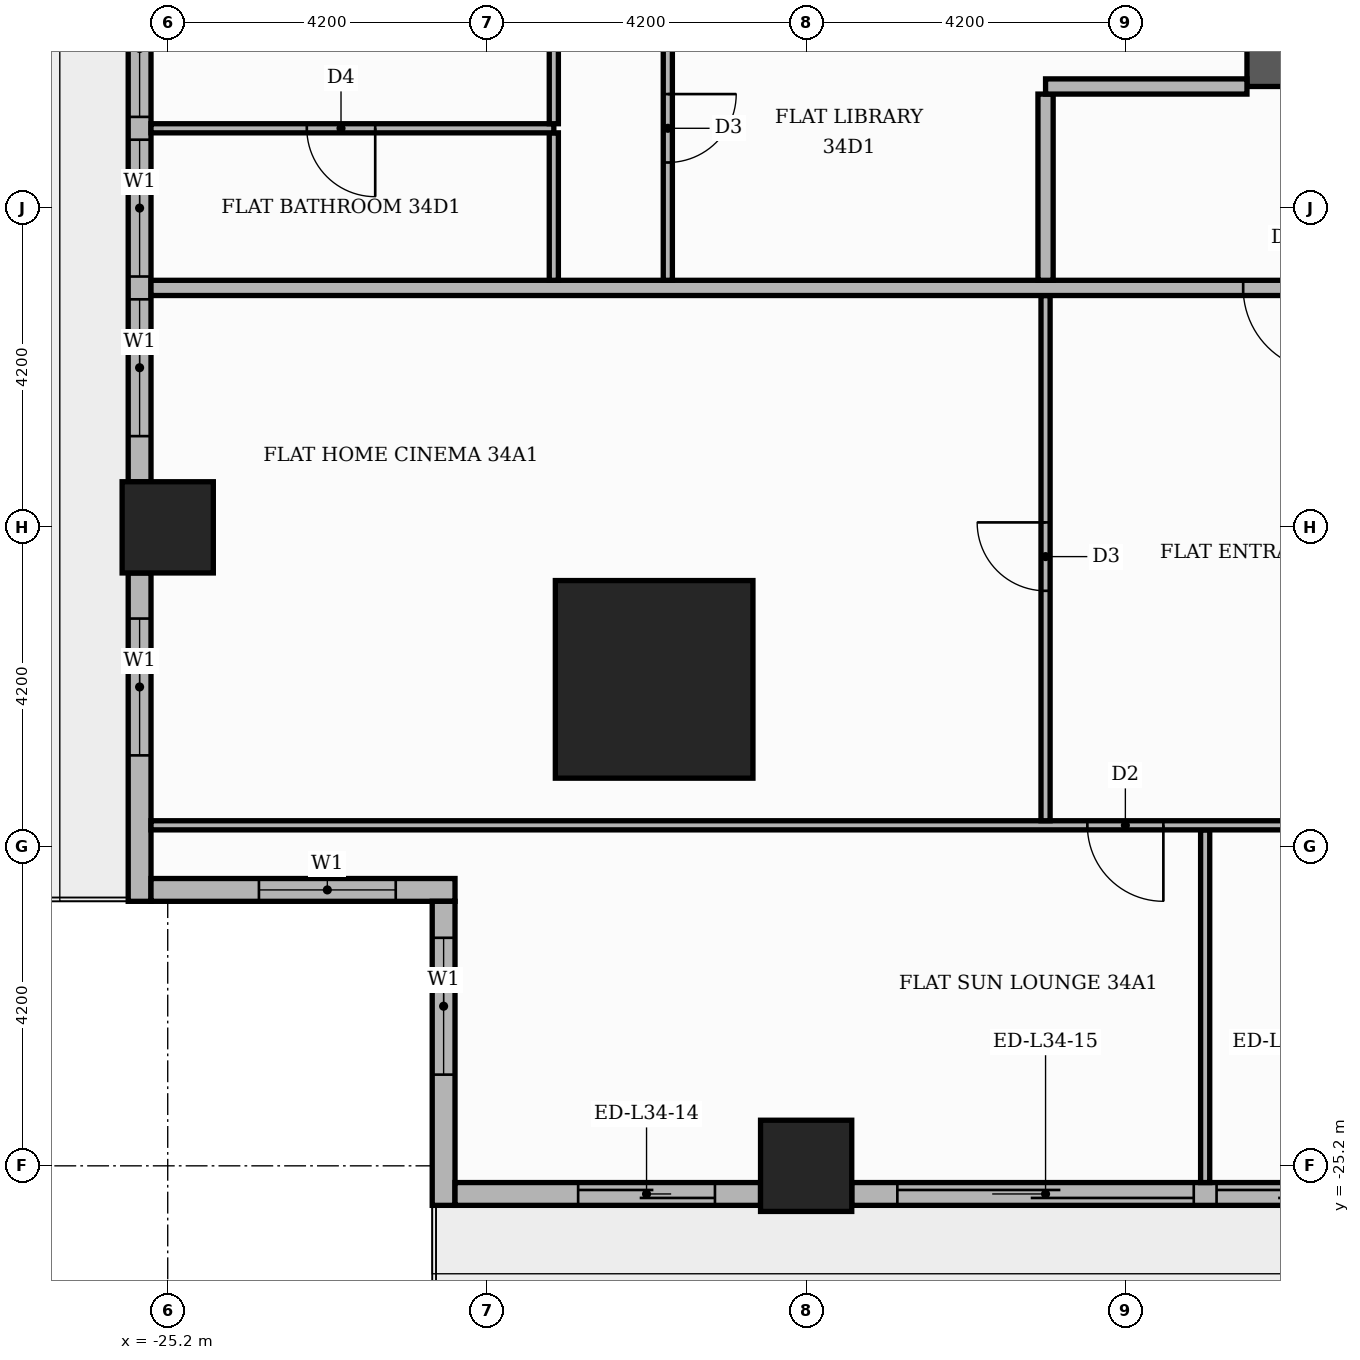
"""IFC4 building model, lengths in metres.
Left out: names, types, materials, properties, quantities, classifications, styles, units other than length and angle.
Written with IfcOpenShell. Run it as: python <this file> out.ifc"""

import sys

from ifc_helpers import new_model, si_unit, direction, frame, frame_2d, origin, origin_2d, place, context, subcontext, project, spatial, rectangle, extrude, element, fill, save


model = new_model("IFC4")
c1 = context("Model", 3, precision=1e-05, world=origin(), true_north=direction((0.0, 1.0)))
c2 = subcontext(c1, "Body", "Model", "MODEL_VIEW")
j1 = project(units=[si_unit("LENGTHUNIT", "METRE"), si_unit("PLANEANGLEUNIT", "RADIAN")], contexts=[c1])
p1 = place(None, origin())
s1 = spatial("IfcSite", under=j1, at=p1, CompositionType="ELEMENT")
p2 = place(p1, origin())
s2 = spatial("IfcBuilding", under=s1, at=p2, CompositionType="ELEMENT")
p3 = place(p2, frame((0.0, 0.0, 145.5)))
s3 = spatial("IfcBuildingStorey", under=s2, at=p3, CompositionType="ELEMENT", Elevation=145.5)
p4 = place(p3, frame((-11.0, -10.55, 0.0), z_axis=(0.0, 0.0, 1.0), x_axis=(1.0, 0.0, 0.0)))
e1 = element("IfcWall", 1, at=p4, inside=s3, PredefinedType="SHEAR", context=c2, shape_type="SweptSolid", body=[
    extrude(rectangle(XDim=22.0, YDim=0.9, at=frame_2d((11.0, 0.0))), origin(), (0.0, 0.0, 1.0), 3.48),
])
p5 = place(p4, frame((7.4, 0.0, 0.0)))
e2 = element("IfcOpeningElement", 2, at=p5, cuts=e1, PredefinedType="OPENING", context=c2, shape_type="SweptSolid", body=[
    extrude(rectangle(XDim=1.8, YDim=2.2, at=frame_2d((0.9, 1.1))), frame((0.0, 0.46, 0.0), z_axis=(0.0, -1.0, 0.0), x_axis=(1.0, 0.0, 0.0)), (0.0, 0.0, 1.0), 0.92),
])
p6 = place(p3, frame((-18.8, -18.8, 0.0), z_axis=(0.0, 0.0, 1.0), x_axis=(1.0, 0.0, 0.0)))
e3 = element("IfcColumn", 3, at=p6, inside=s3, PredefinedType="COLUMN", context=c2, shape_type="SweptSolid", body=[
    extrude(rectangle(XDim=2.6, YDim=2.6, at=origin_2d()), origin(), (0.0, 0.0, 1.0), 3.9),
])
for number, where, z_axis, x_axis in (
    (4, (-16.8, -25.2, 0.0), (0.0, 0.0, 1.0), (1.0, 0.0, 0.0)),
    (5, (-25.2, -16.8, 0.0), (0.0, 0.0, 1.0), (1.0, 0.0, 0.0)),
):
    element("IfcColumn", number, at=place(p3, frame(where, z_axis=z_axis, x_axis=x_axis)), inside=s3, PredefinedType="COLUMN", context=c2, shape_type="SweptSolid", body=[
        extrude(rectangle(XDim=1.2, YDim=1.2, at=origin_2d()), origin(), (0.0, 0.0, 1.0), 3.9),
    ])
p7 = place(p3, frame((-25.57, -9.0, 0.0), z_axis=(0.0, 0.0, 1.0), x_axis=(0.0, -1.0, 0.0)))
e6 = element("IfcWall", 6, at=p7, inside=s3, PredefinedType="STANDARD", context=c2, shape_type="SweptSolid", body=[
    extrude(rectangle(XDim=7.2, YDim=0.3, at=frame_2d((3.6, 0.0))), origin(), (0.0, 0.0, 1.0), 3.48),
])
p8 = place(p7, frame((0.6, 0.0, 0.9)))
e7 = element("IfcOpeningElement", 7, at=p8, cuts=e6, PredefinedType="OPENING", context=c2, shape_type="SweptSolid", body=[
    extrude(rectangle(XDim=1.8, YDim=2.1, at=frame_2d((0.9, 1.05))), frame((0.0, 0.16, 0.0), z_axis=(0.0, -1.0, 0.0), x_axis=(1.0, 0.0, 0.0)), (0.0, 0.0, 1.0), 0.32),
])
p9 = place(p7, frame((2.7, 0.0, 0.9)))
e8 = element("IfcOpeningElement", 8, at=p9, cuts=e6, PredefinedType="OPENING", context=c2, shape_type="SweptSolid", body=[
    extrude(rectangle(XDim=1.8, YDim=2.1, at=frame_2d((0.9, 1.05))), frame((0.0, 0.16, 0.0), z_axis=(0.0, -1.0, 0.0), x_axis=(1.0, 0.0, 0.0)), (0.0, 0.0, 1.0), 0.32),
])
p10 = place(p7, frame((4.8, 0.0, 0.9)))
e9 = element("IfcOpeningElement", 9, at=p10, cuts=e6, PredefinedType="OPENING", context=c2, shape_type="SweptSolid", body=[
    extrude(rectangle(XDim=1.8, YDim=2.1, at=frame_2d((0.9, 1.05))), frame((0.0, 0.16, 0.0), z_axis=(0.0, -1.0, 0.0), x_axis=(1.0, 0.0, 0.0)), (0.0, 0.0, 1.0), 0.32),
])
p11 = place(p3, frame((-25.57, -17.4, 0.0), z_axis=(0.0, 0.0, 1.0), x_axis=(0.0, -1.0, 0.0)))
e10 = element("IfcWall", 10, at=p11, inside=s3, PredefinedType="STANDARD", context=c2, shape_type="SweptSolid", body=[
    extrude(rectangle(XDim=4.32, YDim=0.3, at=frame_2d((2.16, 0.0))), origin(), (0.0, 0.0, 1.0), 3.48),
])
p12 = place(p11, frame((0.6, 0.0, 0.9)))
e11 = element("IfcOpeningElement", 11, at=p12, cuts=e10, PredefinedType="OPENING", context=c2, shape_type="SweptSolid", body=[
    extrude(rectangle(XDim=1.8, YDim=2.1, at=frame_2d((0.9, 1.05))), frame((0.0, 0.16, 0.0), z_axis=(0.0, -1.0, 0.0), x_axis=(1.0, 0.0, 0.0)), (0.0, 0.0, 1.0), 0.32),
])
p13 = place(p3, frame((-25.42, -21.57, 0.0), z_axis=(0.0, 0.0, 1.0), x_axis=(1.0, 0.0, 0.0)))
e12 = element("IfcWall", 12, at=p13, inside=s3, PredefinedType="STANDARD", context=c2, shape_type="SweptSolid", body=[
    extrude(rectangle(XDim=4.0, YDim=0.3, at=frame_2d((2.0, 0.0))), origin(), (0.0, 0.0, 1.0), 3.48),
])
p14 = place(p13, frame((1.42, 0.0, 0.9)))
e13 = element("IfcOpeningElement", 13, at=p14, cuts=e12, PredefinedType="OPENING", context=c2, shape_type="SweptSolid", body=[
    extrude(rectangle(XDim=1.8, YDim=2.1, at=frame_2d((0.9, 1.05))), frame((0.0, 0.16, 0.0), z_axis=(0.0, -1.0, 0.0), x_axis=(1.0, 0.0, 0.0)), (0.0, 0.0, 1.0), 0.32),
])
p15 = place(p3, frame((-21.57, -21.72, 0.0), z_axis=(0.0, 0.0, 1.0), x_axis=(0.0, -1.0, 0.0)))
e14 = element("IfcWall", 14, at=p15, inside=s3, PredefinedType="STANDARD", context=c2, shape_type="SweptSolid", body=[
    extrude(rectangle(XDim=4.0, YDim=0.3, at=frame_2d((2.0, 0.0))), origin(), (0.0, 0.0, 1.0), 3.48),
])
p16 = place(p15, frame((0.48, 0.0, 0.9)))
e15 = element("IfcOpeningElement", 15, at=p16, cuts=e14, PredefinedType="OPENING", context=c2, shape_type="SweptSolid", body=[
    extrude(rectangle(XDim=1.8, YDim=2.1, at=frame_2d((0.9, 1.05))), frame((0.0, 0.16, 0.0), z_axis=(0.0, -1.0, 0.0), x_axis=(1.0, 0.0, 0.0)), (0.0, 0.0, 1.0), 0.32),
])
p17 = place(p3, frame((-21.42, -25.57, 0.0), z_axis=(0.0, 0.0, 1.0), x_axis=(1.0, 0.0, 0.0)))
e16 = element("IfcWall", 16, at=p17, inside=s3, PredefinedType="STANDARD", context=c2, shape_type="SweptSolid", body=[
    extrude(rectangle(XDim=4.02, YDim=0.3, at=frame_2d((2.01, 0.0))), origin(), (0.0, 0.0, 1.0), 3.48),
])
p18 = place(p17, frame((1.62, 0.0, 0.0)))
e17 = element("IfcOpeningElement", 17, at=p18, cuts=e16, PredefinedType="OPENING", context=c2, shape_type="SweptSolid", body=[
    extrude(rectangle(XDim=1.8, YDim=2.4, at=frame_2d((0.9, 1.2))), frame((0.0, 0.16, 0.0), z_axis=(0.0, -1.0, 0.0), x_axis=(1.0, 0.0, 0.0)), (0.0, 0.0, 1.0), 0.32),
])
p19 = place(p3, frame((-16.2, -25.57, 0.0), z_axis=(0.0, 0.0, 1.0), x_axis=(1.0, 0.0, 0.0)))
e18 = element("IfcWall", 18, at=p19, inside=s3, PredefinedType="STANDARD", context=c2, shape_type="SweptSolid", body=[
    extrude(rectangle(XDim=7.2, YDim=0.3, at=frame_2d((3.6, 0.0))), origin(), (0.0, 0.0, 1.0), 3.48),
])
p20 = place(p19, frame((0.6, 0.0, 0.0)))
e19 = element("IfcOpeningElement", 19, at=p20, cuts=e18, PredefinedType="OPENING", context=c2, shape_type="SweptSolid", body=[
    extrude(rectangle(XDim=3.9, YDim=2.4, at=frame_2d((1.95, 1.2))), frame((0.0, 0.16, 0.0), z_axis=(0.0, -1.0, 0.0), x_axis=(1.0, 0.0, 0.0)), (0.0, 0.0, 1.0), 0.32),
])
p21 = place(p19, frame((4.8, 0.0, 0.0)))
e20 = element("IfcOpeningElement", 20, at=p21, cuts=e18, PredefinedType="OPENING", context=c2, shape_type="SweptSolid", body=[
    extrude(rectangle(XDim=1.8, YDim=2.4, at=frame_2d((0.9, 1.2))), frame((0.0, 0.16, 0.0), z_axis=(0.0, -1.0, 0.0), x_axis=(1.0, 0.0, 0.0)), (0.0, 0.0, 1.0), 0.32),
])
p22 = place(p3, frame((-11.55, -25.42, 0.0), z_axis=(0.0, 0.0, 1.0), x_axis=(0.0, 1.0, 0.0)))
e21 = element("IfcWall", 21, at=p22, inside=s3, PredefinedType="PARTITIONING", context=c2, shape_type="SweptSolid", body=[
    extrude(rectangle(XDim=4.64, YDim=0.12, at=frame_2d((2.32, 0.0))), origin(), (0.0, 0.0, 1.0), 3.48),
])
p23 = place(p3, frame((-25.42, -20.72, 0.0), z_axis=(0.0, 0.0, 1.0), x_axis=(1.0, 0.0, 0.0)))
e22 = element("IfcWall", 22, at=p23, inside=s3, PredefinedType="PARTITIONING", context=c2, shape_type="SweptSolid", body=[
    extrude(rectangle(XDim=38.97, YDim=0.12, at=frame_2d((19.485, 0.0))), origin(), (0.0, 0.0, 1.0), 3.48),
])
p24 = place(p23, frame((12.32, 0.0, 0.0)))
e23 = element("IfcOpeningElement", 23, at=p24, cuts=e22, PredefinedType="OPENING", context=c2, shape_type="SweptSolid", body=[
    extrude(rectangle(XDim=1.0, YDim=2.1, at=frame_2d((0.5, 1.05))), frame((0.0, 0.07, 0.0), z_axis=(0.0, -1.0, 0.0), x_axis=(1.0, 0.0, 0.0)), (0.0, 0.0, 1.0), 0.14),
])
p25 = place(p23, frame((17.57, 0.0, 0.0)))
e24 = element("IfcOpeningElement", 24, at=p25, cuts=e22, PredefinedType="OPENING", context=c2, shape_type="SweptSolid", body=[
    extrude(rectangle(XDim=1.0, YDim=2.1, at=frame_2d((0.5, 1.05))), frame((0.0, 0.07, 0.0), z_axis=(0.0, -1.0, 0.0), x_axis=(1.0, 0.0, 0.0)), (0.0, 0.0, 1.0), 0.14),
])
p26 = place(p23, frame((24.97, 0.0, 0.0)))
e25 = element("IfcOpeningElement", 25, at=p26, cuts=e22, PredefinedType="OPENING", context=c2, shape_type="SweptSolid", body=[
    extrude(rectangle(XDim=0.9, YDim=2.1, at=frame_2d((0.45, 1.05))), frame((0.0, 0.07, 0.0), z_axis=(0.0, -1.0, 0.0), x_axis=(1.0, 0.0, 0.0)), (0.0, 0.0, 1.0), 0.14),
])
p27 = place(p23, frame((34.42, 0.0, 0.0)))
e26 = element("IfcOpeningElement", 26, at=p27, cuts=e22, PredefinedType="OPENING", context=c2, shape_type="SweptSolid", body=[
    extrude(rectangle(XDim=0.9, YDim=2.1, at=frame_2d((0.45, 1.05))), frame((0.0, 0.07, 0.0), z_axis=(0.0, -1.0, 0.0), x_axis=(1.0, 0.0, 0.0)), (0.0, 0.0, 1.0), 0.14),
])
p28 = place(p3, frame((-13.65, -20.66, 0.0), z_axis=(0.0, 0.0, 1.0), x_axis=(0.0, 1.0, 0.0)))
e27 = element("IfcWall", 27, at=p28, inside=s3, PredefinedType="PARTITIONING", context=c2, shape_type="SweptSolid", body=[
    extrude(rectangle(XDim=6.91, YDim=0.12, at=frame_2d((3.455, 0.0))), origin(), (0.0, 0.0, 1.0), 3.48),
])
p29 = place(p28, frame((3.025, 0.0, 0.0)))
e28 = element("IfcOpeningElement", 28, at=p29, cuts=e27, PredefinedType="OPENING", context=c2, shape_type="SweptSolid", body=[
    extrude(rectangle(XDim=0.9, YDim=2.1, at=frame_2d((0.45, 1.05))), frame((0.0, 0.07, 0.0), z_axis=(0.0, -1.0, 0.0), x_axis=(1.0, 0.0, 0.0)), (0.0, 0.0, 1.0), 0.14),
])
p30 = place(p3, frame((-25.42, -13.65, 0.0), z_axis=(0.0, 0.0, 1.0), x_axis=(1.0, 0.0, 0.0)))
e29 = element("IfcWall", 29, at=p30, inside=s3, PredefinedType="PARTITIONING", context=c2, shape_type="SweptSolid", body=[
    extrude(rectangle(XDim=39.07, YDim=0.2, at=frame_2d((19.535, 0.0))), origin(), (0.0, 0.0, 1.0), 3.48),
])
p31 = place(p30, frame((14.37, 0.0, 0.0)))
e30 = element("IfcOpeningElement", 30, at=p31, cuts=e29, PredefinedType="OPENING", context=c2, shape_type="SweptSolid", body=[
    extrude(rectangle(XDim=1.1, YDim=2.4, at=frame_2d((0.55, 1.2))), frame((0.0, 0.11, 0.0), z_axis=(0.0, -1.0, 0.0), x_axis=(1.0, 0.0, 0.0)), (0.0, 0.0, 1.0), 0.22),
])
p32 = place(p3, frame((-20.12, -13.55, 0.0), z_axis=(0.0, 0.0, 1.0), x_axis=(0.0, 1.0, 0.0)))
e31 = element("IfcWall", 31, at=p32, inside=s3, PredefinedType="PARTITIONING", context=c2, shape_type="SweptSolid", body=[
    extrude(rectangle(XDim=1.94, YDim=0.12, at=frame_2d((0.97, 0.0))), origin(), (0.0, 0.0, 1.0), 3.48),
])
p33 = place(p3, frame((-18.62, -13.55, 0.0), z_axis=(0.0, 0.0, 1.0), x_axis=(0.0, 1.0, 0.0)))
e32 = element("IfcWall", 32, at=p33, inside=s3, PredefinedType="PARTITIONING", context=c2, shape_type="SweptSolid", body=[
    extrude(rectangle(XDim=4.04, YDim=0.12, at=frame_2d((2.02, 0.0))), origin(), (0.0, 0.0, 1.0), 3.48),
])
p34 = place(p33, frame((1.55, 0.0, 0.0)))
e33 = element("IfcOpeningElement", 33, at=p34, cuts=e32, PredefinedType="OPENING", context=c2, shape_type="SweptSolid", body=[
    extrude(rectangle(XDim=0.9, YDim=2.1, at=frame_2d((0.45, 1.05))), frame((0.0, 0.07, 0.0), z_axis=(0.0, -1.0, 0.0), x_axis=(1.0, 0.0, 0.0)), (0.0, 0.0, 1.0), 0.14),
])
p35 = place(p3, frame((-13.65, -13.55, 0.0), z_axis=(0.0, 0.0, 1.0), x_axis=(0.0, 1.0, 0.0)))
e34 = element("IfcWall", 34, at=p35, inside=s3, PredefinedType="PARTITIONING", context=c2, shape_type="SweptSolid", body=[
    extrude(rectangle(XDim=2.45, YDim=0.2, at=frame_2d((1.225, 0.0))), origin(), (0.0, 0.0, 1.0), 3.48),
])
p36 = place(p3, frame((-25.42, -11.55, 0.0), z_axis=(0.0, 0.0, 1.0), x_axis=(1.0, 0.0, 0.0)))
e35 = element("IfcWall", 35, at=p36, inside=s3, PredefinedType="PARTITIONING", context=c2, shape_type="SweptSolid", body=[
    extrude(rectangle(XDim=5.3, YDim=0.12, at=frame_2d((2.65, 0.0))), origin(), (0.0, 0.0, 1.0), 3.48),
])
p37 = place(p36, frame((2.05, 0.0, 0.0)))
e36 = element("IfcOpeningElement", 36, at=p37, cuts=e35, PredefinedType="OPENING", context=c2, shape_type="SweptSolid", body=[
    extrude(rectangle(XDim=0.9, YDim=2.1, at=frame_2d((0.45, 1.05))), frame((0.0, 0.07, 0.0), z_axis=(0.0, -1.0, 0.0), x_axis=(1.0, 0.0, 0.0)), (0.0, 0.0, 1.0), 0.14),
])
p38 = place(p3, frame((-20.12, -11.49, 0.0), z_axis=(0.0, 0.0, 1.0), x_axis=(0.0, 1.0, 0.0)))
e37 = element("IfcWall", 37, at=p38, inside=s3, PredefinedType="PARTITIONING", context=c2, shape_type="SweptSolid", body=[
    extrude(rectangle(XDim=4.08, YDim=0.12, at=frame_2d((2.04, 0.0))), origin(), (0.0, 0.0, 1.0), 3.48),
])
p39 = place(p38, frame((1.59, 0.0, 0.0)))
e38 = element("IfcOpeningElement", 38, at=p39, cuts=e37, PredefinedType="OPENING", context=c2, shape_type="SweptSolid", body=[
    extrude(rectangle(XDim=0.9, YDim=2.1, at=frame_2d((0.45, 1.05))), frame((0.0, 0.07, 0.0), z_axis=(0.0, -1.0, 0.0), x_axis=(1.0, 0.0, 0.0)), (0.0, 0.0, 1.0), 0.14),
])
p40 = place(p3, frame((-13.65, -11.0, 0.0), z_axis=(0.0, 0.0, 1.0), x_axis=(1.0, 0.0, 0.0)))
e39 = element("IfcWall", 39, at=p40, inside=s3, PredefinedType="PARTITIONING", context=c2, shape_type="SweptSolid", body=[
    extrude(rectangle(XDim=2.65, YDim=0.2, at=frame_2d((1.325, 0.0))), origin(), (0.0, 0.0, 1.0), 3.48),
])
p41 = place(p8, origin())
e40 = element("IfcWindow", 40, at=p41, inside=s3, PartitioningType="SINGLE_PANEL", PredefinedType="WINDOW", context=c2, shape_type="SweptSolid", body=[
    extrude(rectangle(XDim=1.8, YDim=2.1, at=frame_2d((0.9, 1.05))), frame((0.0, 0.03, 0.0), z_axis=(0.0, -1.0, 0.0), x_axis=(1.0, 0.0, 0.0)), (0.0, 0.0, 1.0), 0.06),
])
fill(e7, e40)
p42 = place(p9, origin())
e41 = element("IfcWindow", 41, at=p42, inside=s3, PartitioningType="SINGLE_PANEL", PredefinedType="WINDOW", context=c2, shape_type="SweptSolid", body=[
    extrude(rectangle(XDim=1.8, YDim=2.1, at=frame_2d((0.9, 1.05))), frame((0.0, 0.03, 0.0), z_axis=(0.0, -1.0, 0.0), x_axis=(1.0, 0.0, 0.0)), (0.0, 0.0, 1.0), 0.06),
])
fill(e8, e41)
p43 = place(p10, origin())
e42 = element("IfcWindow", 42, at=p43, inside=s3, PartitioningType="SINGLE_PANEL", PredefinedType="WINDOW", context=c2, shape_type="SweptSolid", body=[
    extrude(rectangle(XDim=1.8, YDim=2.1, at=frame_2d((0.9, 1.05))), frame((0.0, 0.03, 0.0), z_axis=(0.0, -1.0, 0.0), x_axis=(1.0, 0.0, 0.0)), (0.0, 0.0, 1.0), 0.06),
])
fill(e9, e42)
p44 = place(p12, origin())
e43 = element("IfcWindow", 43, at=p44, inside=s3, PartitioningType="SINGLE_PANEL", PredefinedType="WINDOW", context=c2, shape_type="SweptSolid", body=[
    extrude(rectangle(XDim=1.8, YDim=2.1, at=frame_2d((0.9, 1.05))), frame((0.0, 0.03, 0.0), z_axis=(0.0, -1.0, 0.0), x_axis=(1.0, 0.0, 0.0)), (0.0, 0.0, 1.0), 0.06),
])
fill(e11, e43)
p45 = place(p14, origin())
e44 = element("IfcWindow", 44, at=p45, inside=s3, PartitioningType="SINGLE_PANEL", PredefinedType="WINDOW", context=c2, shape_type="SweptSolid", body=[
    extrude(rectangle(XDim=1.8, YDim=2.1, at=frame_2d((0.9, 1.05))), frame((0.0, 0.03, 0.0), z_axis=(0.0, -1.0, 0.0), x_axis=(1.0, 0.0, 0.0)), (0.0, 0.0, 1.0), 0.06),
])
fill(e13, e44)
p46 = place(p16, origin())
e45 = element("IfcWindow", 45, at=p46, inside=s3, PartitioningType="SINGLE_PANEL", PredefinedType="WINDOW", context=c2, shape_type="SweptSolid", body=[
    extrude(rectangle(XDim=1.8, YDim=2.1, at=frame_2d((0.9, 1.05))), frame((0.0, 0.03, 0.0), z_axis=(0.0, -1.0, 0.0), x_axis=(1.0, 0.0, 0.0)), (0.0, 0.0, 1.0), 0.06),
])
fill(e15, e45)
p47 = place(p18, origin())
e46 = element("IfcDoor", 46, at=p47, inside=s3, OperationType="SLIDING_TO_RIGHT", PredefinedType="DOOR", context=c2, shape_type="SweptSolid", body=[
    extrude(rectangle(XDim=1.8, YDim=2.4, at=frame_2d((0.9, 1.2))), frame((0.0, 0.025, 0.0), z_axis=(0.0, -1.0, 0.0), x_axis=(1.0, 0.0, 0.0)), (0.0, 0.0, 1.0), 0.05),
])
fill(e17, e46)
p48 = place(p20, origin())
e47 = element("IfcDoor", 47, at=p48, inside=s3, OperationType="SLIDING_TO_LEFT", PredefinedType="DOOR", context=c2, shape_type="SweptSolid", body=[
    extrude(rectangle(XDim=3.9, YDim=2.4, at=frame_2d((1.95, 1.2))), frame((0.0, 0.025, 0.0), z_axis=(0.0, -1.0, 0.0), x_axis=(1.0, 0.0, 0.0)), (0.0, 0.0, 1.0), 0.05),
])
fill(e19, e47)
p49 = place(p21, origin())
e48 = element("IfcDoor", 48, at=p49, inside=s3, OperationType="SLIDING_TO_RIGHT", PredefinedType="DOOR", context=c2, shape_type="SweptSolid", body=[
    extrude(rectangle(XDim=1.8, YDim=2.4, at=frame_2d((0.9, 1.2))), frame((0.0, 0.025, 0.0), z_axis=(0.0, -1.0, 0.0), x_axis=(1.0, 0.0, 0.0)), (0.0, 0.0, 1.0), 0.05),
])
fill(e20, e48)
p50 = place(p31, frame((1.1, 0.0, 0.0), z_axis=(0.0, 0.0, 1.0), x_axis=(-1.0, 0.0, 0.0)))
e49 = element("IfcDoor", 49, at=p50, inside=s3, OperationType="SINGLE_SWING_RIGHT", PredefinedType="DOOR", context=c2, shape_type="SweptSolid", body=[
    extrude(rectangle(XDim=1.1, YDim=2.4, at=frame_2d((0.55, 1.2))), frame((0.0, 0.025, 0.0), z_axis=(0.0, -1.0, 0.0), x_axis=(1.0, 0.0, 0.0)), (0.0, 0.0, 1.0), 0.05),
])
fill(e30, e49)
p51 = place(p29, origin())
e50 = element("IfcDoor", 50, at=p51, inside=s3, OperationType="SINGLE_SWING_RIGHT", PredefinedType="DOOR", context=c2, shape_type="SweptSolid", body=[
    extrude(rectangle(XDim=0.9, YDim=2.1, at=frame_2d((0.45, 1.05))), frame((0.0, 0.025, 0.0), z_axis=(0.0, -1.0, 0.0), x_axis=(1.0, 0.0, 0.0)), (0.0, 0.0, 1.0), 0.05),
])
fill(e28, e50)
p52 = place(p24, frame((1.0, 0.0, 0.0), z_axis=(0.0, 0.0, 1.0), x_axis=(-1.0, 0.0, 0.0)))
e51 = element("IfcDoor", 51, at=p52, inside=s3, OperationType="SINGLE_SWING_RIGHT", PredefinedType="DOOR", context=c2, shape_type="SweptSolid", body=[
    extrude(rectangle(XDim=1.0, YDim=2.1, at=frame_2d((0.5, 1.05))), frame((0.0, 0.025, 0.0), z_axis=(0.0, -1.0, 0.0), x_axis=(1.0, 0.0, 0.0)), (0.0, 0.0, 1.0), 0.05),
])
fill(e23, e51)
p53 = place(p34, frame((0.9, 0.0, 0.0), z_axis=(0.0, 0.0, 1.0), x_axis=(-1.0, 0.0, 0.0)))
e52 = element("IfcDoor", 52, at=p53, inside=s3, OperationType="SINGLE_SWING_RIGHT", PredefinedType="DOOR", context=c2, shape_type="SweptSolid", body=[
    extrude(rectangle(XDim=0.9, YDim=2.1, at=frame_2d((0.45, 1.05))), frame((0.0, 0.025, 0.0), z_axis=(0.0, -1.0, 0.0), x_axis=(1.0, 0.0, 0.0)), (0.0, 0.0, 1.0), 0.05),
])
fill(e33, e52)
p54 = place(p37, frame((0.9, 0.0, 0.0), z_axis=(0.0, 0.0, 1.0), x_axis=(-1.0, 0.0, 0.0)))
e53 = element("IfcDoor", 53, at=p54, inside=s3, OperationType="SINGLE_SWING_RIGHT", PredefinedType="DOOR", context=c2, shape_type="SweptSolid", body=[
    extrude(rectangle(XDim=0.9, YDim=2.1, at=frame_2d((0.45, 1.05))), frame((0.0, 0.025, 0.0), z_axis=(0.0, -1.0, 0.0), x_axis=(1.0, 0.0, 0.0)), (0.0, 0.0, 1.0), 0.05),
])
fill(e36, e53)
save(model, sys.argv[1])
